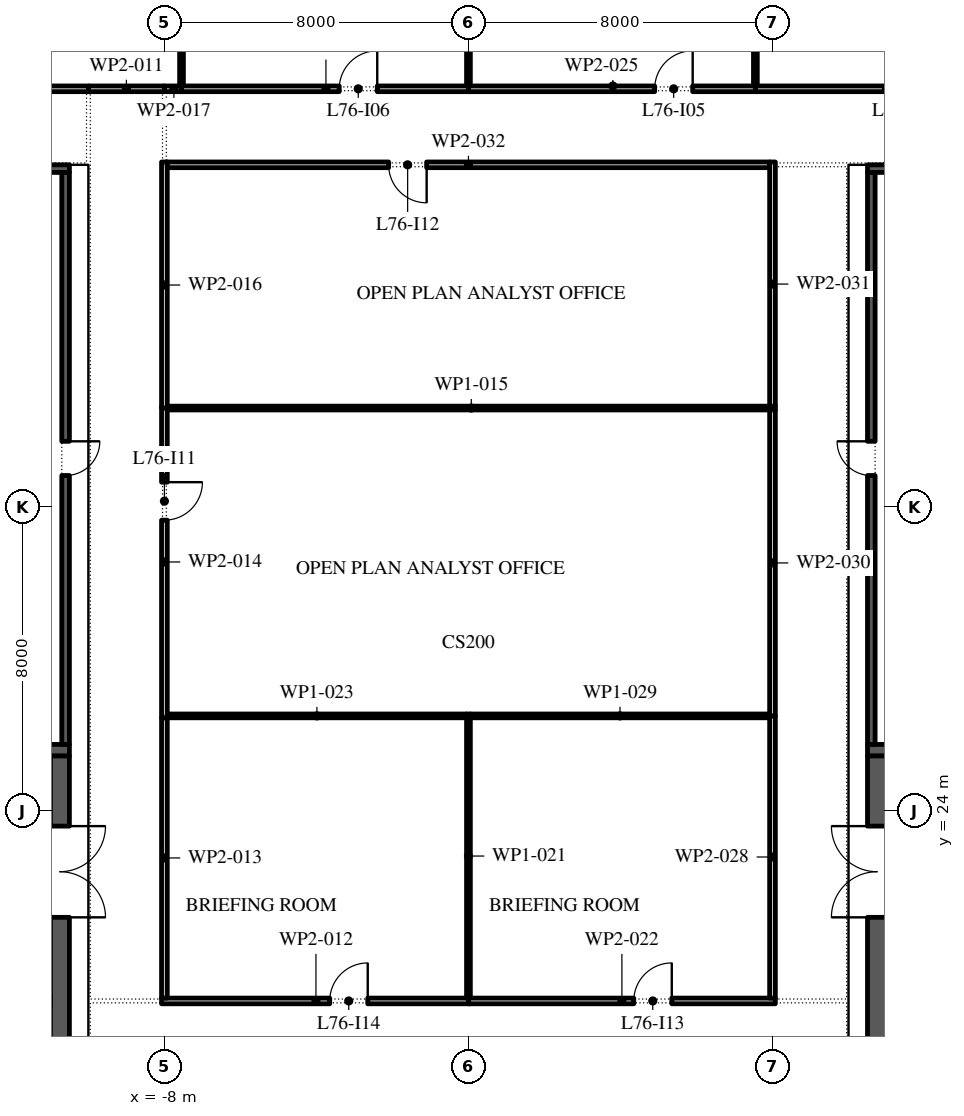
"""IFC4 building model, lengths in metres.
Left out: names, types, materials, properties, quantities, classifications, styles, units other than length and angle.
Written with IfcOpenShell. Run it as: python <this file> out.ifc"""

import sys

from ifc_helpers import new_model, si_unit, direction, frame, frame_2d, origin, place, context, subcontext, project, spatial, rectangle, extrude, element, fill, save


model = new_model("IFC4")
c1 = context("Model", 3, precision=1e-05, world=origin(), true_north=direction((0.0, 1.0)))
c2 = subcontext(c1, "Body", "Model", "MODEL_VIEW")
j1 = project(units=[si_unit("LENGTHUNIT", "METRE"), si_unit("PLANEANGLEUNIT", "RADIAN")], contexts=[c1])
p1 = place(None, origin())
s1 = spatial("IfcSite", under=j1, at=p1, CompositionType="ELEMENT")
p2 = place(p1, origin())
s2 = spatial("IfcBuilding", under=s1, at=p2, CompositionType="ELEMENT")
p3 = place(p2, frame((0.0, 0.0, 346.8)))
s3 = spatial("IfcBuildingStorey", under=s2, at=p3, CompositionType="ELEMENT", Elevation=346.8)
p4 = place(p3, frame((-10.75, -2.45, 0.0), z_axis=(0.0, 0.0, 1.0), x_axis=(0.0, 1.0, 0.0)))
e1 = element("IfcWall", 1, at=p4, inside=s3, PredefinedType="SHEAR", context=c2, shape_type="SweptSolid", body=[
    extrude(rectangle(XDim=27.9, YDim=0.5, at=frame_2d((13.95, 0.0))), origin(), (0.0, 0.0, 1.0), 4.0),
])
p5 = place(p4, frame((23.65, 0.0, 0.0)))
e2 = element("IfcOpeningElement", 2, at=p5, cuts=e1, PredefinedType="OPENING", context=c2, shape_type="SweptSolid", body=[
    extrude(rectangle(XDim=2.4, YDim=2.1, at=frame_2d((1.2, 1.05))), frame((0.0, 0.26, 0.0), z_axis=(0.0, -1.0, 0.0), x_axis=(1.0, 0.0, 0.0)), (0.0, 0.0, 1.0), 0.52),
])
p6 = place(p4, frame((1.387, 0.0, 0.0)))
e3 = element("IfcOpeningElement", 3, at=p6, cuts=e1, PredefinedType="OPENING", context=c2, shape_type="SweptSolid", body=[
    extrude(rectangle(XDim=0.9, YDim=2.1, at=frame_2d((0.45, 1.05))), frame((0.0, 0.26, 0.0), z_axis=(0.0, -1.0, 0.0), x_axis=(1.0, 0.0, 0.0)), (0.0, 0.0, 1.0), 0.52),
])
p7 = place(p4, frame((4.562, 0.0, 0.0)))
e4 = element("IfcOpeningElement", 4, at=p7, cuts=e1, PredefinedType="OPENING", context=c2, shape_type="SweptSolid", body=[
    extrude(rectangle(XDim=1.0, YDim=2.1, at=frame_2d((0.5, 1.05))), frame((0.0, 0.26, 0.0), z_axis=(0.0, -1.0, 0.0), x_axis=(1.0, 0.0, 0.0)), (0.0, 0.0, 1.0), 0.52),
])
p8 = place(p3, frame((-21.5, 25.6, 0.0), z_axis=(0.0, 0.0, 1.0), x_axis=(1.0, 0.0, 0.0)))
e5 = element("IfcWall", 5, at=p8, inside=s3, PredefinedType="SHEAR", context=c2, shape_type="SweptSolid", body=[
    extrude(rectangle(XDim=11.0, YDim=0.3, at=frame_2d((5.5, 0.0))), origin(), (0.0, 0.0, 1.0), 4.0),
])
p9 = place(p3, frame((-10.6, 25.75, 0.0), z_axis=(0.0, 0.0, 1.0), x_axis=(0.0, 1.0, 0.0)))
e6 = element("IfcWall", 6, at=p9, inside=s3, PredefinedType="SHEAR", context=c2, shape_type="SweptSolid", body=[
    extrude(rectangle(XDim=15.05, YDim=0.2, at=frame_2d((7.525, 0.0))), origin(), (0.0, 0.0, 1.0), 4.0),
])
p10 = place(p9, frame((7.075, 0.0, 0.0)))
e7 = element("IfcOpeningElement", 7, at=p10, cuts=e6, PredefinedType="OPENING", context=c2, shape_type="SweptSolid", body=[
    extrude(rectangle(XDim=0.9, YDim=2.1, at=frame_2d((0.45, 1.05))), frame((0.0, 0.11, 0.0), z_axis=(0.0, -1.0, 0.0), x_axis=(1.0, 0.0, 0.0)), (0.0, 0.0, 1.0), 0.22),
])
p11 = place(p3, frame((-21.5, 40.9, 0.0), z_axis=(0.0, 0.0, 1.0), x_axis=(1.0, 0.0, 0.0)))
e8 = element("IfcWall", 8, at=p11, inside=s3, PredefinedType="SHEAR", context=c2, shape_type="SweptSolid", body=[
    extrude(rectangle(XDim=11.0, YDim=0.2, at=frame_2d((5.5, 0.0))), origin(), (0.0, 0.0, 1.0), 4.0),
])
p12 = place(p3, frame((10.75, -2.45, 0.0), z_axis=(0.0, 0.0, 1.0), x_axis=(0.0, 1.0, 0.0)))
e9 = element("IfcWall", 9, at=p12, inside=s3, PredefinedType="SHEAR", context=c2, shape_type="SweptSolid", body=[
    extrude(rectangle(XDim=27.9, YDim=0.5, at=frame_2d((13.95, 0.0))), origin(), (0.0, 0.0, 1.0), 4.0),
])
p13 = place(p12, frame((23.65, 0.0, 0.0)))
e10 = element("IfcOpeningElement", 10, at=p13, cuts=e9, PredefinedType="OPENING", context=c2, shape_type="SweptSolid", body=[
    extrude(rectangle(XDim=2.4, YDim=2.1, at=frame_2d((1.2, 1.05))), frame((0.0, 0.26, 0.0), z_axis=(0.0, -1.0, 0.0), x_axis=(1.0, 0.0, 0.0)), (0.0, 0.0, 1.0), 0.52),
])
p14 = place(p12, frame((0.788, 0.0, 0.0)))
e11 = element("IfcOpeningElement", 11, at=p14, cuts=e9, PredefinedType="OPENING", context=c2, shape_type="SweptSolid", body=[
    extrude(rectangle(XDim=0.9, YDim=2.1, at=frame_2d((0.45, 1.05))), frame((0.0, 0.26, 0.0), z_axis=(0.0, -1.0, 0.0), x_axis=(1.0, 0.0, 0.0)), (0.0, 0.0, 1.0), 0.52),
])
p15 = place(p12, frame((3.962, 0.0, 0.0)))
e12 = element("IfcOpeningElement", 12, at=p15, cuts=e9, PredefinedType="OPENING", context=c2, shape_type="SweptSolid", body=[
    extrude(rectangle(XDim=1.0, YDim=2.1, at=frame_2d((0.5, 1.05))), frame((0.0, 0.26, 0.0), z_axis=(0.0, -1.0, 0.0), x_axis=(1.0, 0.0, 0.0)), (0.0, 0.0, 1.0), 0.52),
])
p16 = place(p3, frame((10.5, 25.6, 0.0), z_axis=(0.0, 0.0, 1.0), x_axis=(1.0, 0.0, 0.0)))
e13 = element("IfcWall", 13, at=p16, inside=s3, PredefinedType="SHEAR", context=c2, shape_type="SweptSolid", body=[
    extrude(rectangle(XDim=11.0, YDim=0.3, at=frame_2d((5.5, 0.0))), origin(), (0.0, 0.0, 1.0), 4.0),
])
p17 = place(p3, frame((10.6, 25.75, 0.0), z_axis=(0.0, 0.0, 1.0), x_axis=(0.0, 1.0, 0.0)))
e14 = element("IfcWall", 14, at=p17, inside=s3, PredefinedType="SHEAR", context=c2, shape_type="SweptSolid", body=[
    extrude(rectangle(XDim=15.05, YDim=0.2, at=frame_2d((7.525, 0.0))), origin(), (0.0, 0.0, 1.0), 4.0),
])
p18 = place(p17, frame((7.075, 0.0, 0.0)))
e15 = element("IfcOpeningElement", 15, at=p18, cuts=e14, PredefinedType="OPENING", context=c2, shape_type="SweptSolid", body=[
    extrude(rectangle(XDim=0.9, YDim=2.1, at=frame_2d((0.45, 1.05))), frame((0.0, 0.11, 0.0), z_axis=(0.0, -1.0, 0.0), x_axis=(1.0, 0.0, 0.0)), (0.0, 0.0, 1.0), 0.22),
])
p19 = place(p3, frame((10.5, 40.9, 0.0), z_axis=(0.0, 0.0, 1.0), x_axis=(1.0, 0.0, 0.0)))
e16 = element("IfcWall", 16, at=p19, inside=s3, PredefinedType="SHEAR", context=c2, shape_type="SweptSolid", body=[
    extrude(rectangle(XDim=11.0, YDim=0.2, at=frame_2d((5.5, 0.0))), origin(), (0.0, 0.0, 1.0), 4.0),
])
p20 = place(p3, frame((-15.1, 43.0, 0.0), z_axis=(0.0, 0.0, 1.0), x_axis=(1.0, 0.0, 0.0)))
e17 = element("IfcWall", 17, at=p20, inside=s3, PredefinedType="PARTITIONING", context=c2, shape_type="SweptSolid", body=[
    extrude(rectangle(XDim=5.1, YDim=0.15, at=frame_2d((2.55, 0.0))), origin(), (0.0, 0.0, 1.0), 4.0),
])
p21 = place(p20, frame((1.95, 0.0, 0.0)))
e18 = element("IfcOpeningElement", 18, at=p21, cuts=e17, PredefinedType="OPENING", context=c2, shape_type="SweptSolid", body=[
    extrude(rectangle(XDim=1.0, YDim=2.1, at=frame_2d((0.5, 1.05))), frame((0.0, 0.085, 0.0), z_axis=(0.0, -1.0, 0.0), x_axis=(1.0, 0.0, 0.0)), (0.0, 0.0, 1.0), 0.17),
])
p22 = place(p3, frame((-10.0, 43.0, 0.0), z_axis=(0.0, 0.0, 1.0), x_axis=(1.0, 0.0, 0.0)))
e19 = element("IfcWall", 19, at=p22, inside=s3, PredefinedType="PARTITIONING", context=c2, shape_type="SweptSolid", body=[
    extrude(rectangle(XDim=2.0, YDim=0.15, at=frame_2d((1.0, 0.0))), origin(), (0.0, 0.0, 1.0), 4.0),
])
p23 = place(p3, frame((-8.075, 19.0, 0.0), z_axis=(0.0, 0.0, 1.0), x_axis=(1.0, 0.0, 0.0)))
e20 = element("IfcWall", 20, at=p23, inside=s3, PredefinedType="PARTITIONING", context=c2, shape_type="SweptSolid", body=[
    extrude(rectangle(XDim=8.125, YDim=0.15, at=frame_2d((4.062, 0.0))), origin(), (0.0, 0.0, 1.0), 4.0),
])
p24 = place(p23, frame((4.425, 0.0, 0.0)))
e21 = element("IfcOpeningElement", 21, at=p24, cuts=e20, PredefinedType="OPENING", context=c2, shape_type="SweptSolid", body=[
    extrude(rectangle(XDim=1.0, YDim=2.1, at=frame_2d((0.5, 1.05))), frame((0.0, 0.085, 0.0), z_axis=(0.0, -1.0, 0.0), x_axis=(1.0, 0.0, 0.0)), (0.0, 0.0, 1.0), 0.17),
])
p25 = place(p3, frame((-8.0, 26.45, 0.0), z_axis=(0.0, 0.0, 1.0), x_axis=(0.0, -1.0, 0.0)))
e22 = element("IfcWall", 22, at=p25, inside=s3, PredefinedType="PARTITIONING", context=c2, shape_type="SweptSolid", body=[
    extrude(rectangle(XDim=7.375, YDim=0.15, at=frame_2d((3.688, 0.0))), origin(), (0.0, 0.0, 1.0), 4.0),
])
p26 = place(p3, frame((-8.0, 34.65, 0.0), z_axis=(0.0, 0.0, 1.0), x_axis=(0.0, -1.0, 0.0)))
e23 = element("IfcWall", 23, at=p26, inside=s3, PredefinedType="PARTITIONING", context=c2, shape_type="SweptSolid", body=[
    extrude(rectangle(XDim=8.2, YDim=0.15, at=frame_2d((4.1, 0.0))), origin(), (0.0, 0.0, 1.0), 4.0),
])
p27 = place(p26, frame((2.0, 0.0, 0.0)))
e24 = element("IfcOpeningElement", 24, at=p27, cuts=e23, PredefinedType="OPENING", context=c2, shape_type="SweptSolid", body=[
    extrude(rectangle(XDim=1.0, YDim=2.1, at=frame_2d((0.5, 1.05))), frame((0.0, 0.085, 0.0), z_axis=(0.0, -1.0, 0.0), x_axis=(1.0, 0.0, 0.0)), (0.0, 0.0, 1.0), 0.17),
])
p28 = place(p3, frame((-7.925, 34.6, 0.0), z_axis=(0.0, 0.0, 1.0), x_axis=(1.0, 0.0, 0.0)))
e25 = element("IfcWall", 25, at=p28, inside=s3, PredefinedType="PARTITIONING", context=c2, shape_type="SweptSolid", body=[
    extrude(rectangle(XDim=16.0, YDim=0.1, at=frame_2d((8.0, 0.0))), origin(), (0.0, 0.0, 1.0), 4.0),
])
p29 = place(p3, frame((-8.0, 41.075, 0.0), z_axis=(0.0, 0.0, 1.0), x_axis=(0.0, -1.0, 0.0)))
e26 = element("IfcWall", 26, at=p29, inside=s3, PredefinedType="PARTITIONING", context=c2, shape_type="SweptSolid", body=[
    extrude(rectangle(XDim=6.475, YDim=0.15, at=frame_2d((3.237, 0.0))), origin(), (0.0, 0.0, 1.0), 4.0),
])
p30 = place(p3, frame((-8.0, 43.0, 0.0), z_axis=(0.0, 0.0, 1.0), x_axis=(1.0, 0.0, 0.0)))
e27 = element("IfcWall", 27, at=p30, inside=s3, PredefinedType="PARTITIONING", context=c2, shape_type="SweptSolid", body=[
    extrude(rectangle(XDim=0.5, YDim=0.15, at=frame_2d((0.25, 0.0))), origin(), (0.0, 0.0, 1.0), 4.0),
])
p31 = place(p3, frame((-7.55, 43.075, 0.0), z_axis=(0.0, 0.0, 1.0), x_axis=(0.0, 1.0, 0.0)))
e28 = element("IfcWall", 28, at=p31, inside=s3, PredefinedType="PARTITIONING", context=c2, shape_type="SweptSolid", body=[
    extrude(rectangle(XDim=3.875, YDim=0.1, at=frame_2d((1.938, 0.0))), origin(), (0.0, 0.0, 1.0), 3.096),
])
p32 = place(p3, frame((-7.55, 43.0, 0.0), z_axis=(0.0, 0.0, 1.0), x_axis=(1.0, 0.0, 0.0)))
e29 = element("IfcWall", 29, at=p32, inside=s3, PredefinedType="PARTITIONING", context=c2, shape_type="SweptSolid", body=[
    extrude(rectangle(XDim=7.6, YDim=0.15, at=frame_2d((3.8, 0.0))), origin(), (0.0, 0.0, 1.0), 4.0),
])
p33 = place(p32, frame((4.15, 0.0, 0.0)))
e30 = element("IfcOpeningElement", 30, at=p33, cuts=e29, PredefinedType="OPENING", context=c2, shape_type="SweptSolid", body=[
    extrude(rectangle(XDim=1.0, YDim=2.1, at=frame_2d((0.5, 1.05))), frame((0.0, 0.085, 0.0), z_axis=(0.0, -1.0, 0.0), x_axis=(1.0, 0.0, 0.0)), (0.0, 0.0, 1.0), 0.17),
])
p34 = place(p3, frame((0.0, 19.075, 0.0), z_axis=(0.0, 0.0, 1.0), x_axis=(0.0, 1.0, 0.0)))
e31 = element("IfcWall", 31, at=p34, inside=s3, PredefinedType="PARTITIONING", context=c2, shape_type="SweptSolid", body=[
    extrude(rectangle(XDim=7.475, YDim=0.1, at=frame_2d((3.738, 0.0))), origin(), (0.0, 0.0, 1.0), 4.0),
])
p35 = place(p3, frame((0.0, 19.0, 0.0), z_axis=(0.0, 0.0, 1.0), x_axis=(1.0, 0.0, 0.0)))
e32 = element("IfcWall", 32, at=p35, inside=s3, PredefinedType="PARTITIONING", context=c2, shape_type="SweptSolid", body=[
    extrude(rectangle(XDim=8.075, YDim=0.15, at=frame_2d((4.038, 0.0))), origin(), (0.0, 0.0, 1.0), 4.0),
])
p36 = place(p35, frame((4.35, 0.0, 0.0)))
e33 = element("IfcOpeningElement", 33, at=p36, cuts=e32, PredefinedType="OPENING", context=c2, shape_type="SweptSolid", body=[
    extrude(rectangle(XDim=1.0, YDim=2.1, at=frame_2d((0.5, 1.05))), frame((0.0, 0.085, 0.0), z_axis=(0.0, -1.0, 0.0), x_axis=(1.0, 0.0, 0.0)), (0.0, 0.0, 1.0), 0.17),
])
p37 = place(p3, frame((-0.05, 26.5, 0.0), z_axis=(0.0, 0.0, 1.0), x_axis=(-1.0, 0.0, 0.0)))
e34 = element("IfcWall", 34, at=p37, inside=s3, PredefinedType="PARTITIONING", context=c2, shape_type="SweptSolid", body=[
    extrude(rectangle(XDim=7.875, YDim=0.1, at=frame_2d((3.938, 0.0))), origin(), (0.0, 0.0, 1.0), 4.0),
])
p38 = place(p3, frame((0.0, 43.075, 0.0), z_axis=(0.0, 0.0, 1.0), x_axis=(0.0, 1.0, 0.0)))
e35 = element("IfcWall", 35, at=p38, inside=s3, PredefinedType="PARTITIONING", context=c2, shape_type="SweptSolid", body=[
    extrude(rectangle(XDim=9.725, YDim=0.1, at=frame_2d((4.863, 0.0))), origin(), (0.0, 0.0, 1.0), 4.0),
])
p39 = place(p3, frame((0.0, 43.0, 0.0), z_axis=(0.0, 0.0, 1.0), x_axis=(1.0, 0.0, 0.0)))
e36 = element("IfcWall", 36, at=p39, inside=s3, PredefinedType="PARTITIONING", context=c2, shape_type="SweptSolid", body=[
    extrude(rectangle(XDim=7.6, YDim=0.15, at=frame_2d((3.8, 0.0))), origin(), (0.0, 0.0, 1.0), 4.0),
])
p40 = place(p39, frame((4.9, 0.0, 0.0)))
e37 = element("IfcOpeningElement", 37, at=p40, cuts=e36, PredefinedType="OPENING", context=c2, shape_type="SweptSolid", body=[
    extrude(rectangle(XDim=1.0, YDim=2.1, at=frame_2d((0.5, 1.05))), frame((0.0, 0.085, 0.0), z_axis=(0.0, -1.0, 0.0), x_axis=(1.0, 0.0, 0.0)), (0.0, 0.0, 1.0), 0.17),
])
p41 = place(p3, frame((7.55, 43.075, 0.0), z_axis=(0.0, 0.0, 1.0), x_axis=(0.0, 1.0, 0.0)))
e38 = element("IfcWall", 38, at=p41, inside=s3, PredefinedType="PARTITIONING", context=c2, shape_type="SweptSolid", body=[
    extrude(rectangle(XDim=9.725, YDim=0.1, at=frame_2d((4.863, 0.0))), origin(), (0.0, 0.0, 1.0), 3.096),
])
p42 = place(p3, frame((7.55, 43.0, 0.0), z_axis=(0.0, 0.0, 1.0), x_axis=(1.0, 0.0, 0.0)))
e39 = element("IfcWall", 39, at=p42, inside=s3, PredefinedType="PARTITIONING", context=c2, shape_type="SweptSolid", body=[
    extrude(rectangle(XDim=7.5, YDim=0.15, at=frame_2d((3.75, 0.0))), origin(), (0.0, 0.0, 1.0), 4.0),
])
p43 = place(p42, frame((3.4, 0.0, 0.0)))
e40 = element("IfcOpeningElement", 40, at=p43, cuts=e39, PredefinedType="OPENING", context=c2, shape_type="SweptSolid", body=[
    extrude(rectangle(XDim=1.0, YDim=2.1, at=frame_2d((0.5, 1.05))), frame((0.0, 0.085, 0.0), z_axis=(0.0, -1.0, 0.0), x_axis=(1.0, 0.0, 0.0)), (0.0, 0.0, 1.0), 0.17),
])
p44 = place(p3, frame((8.0, 19.075, 0.0), z_axis=(0.0, 0.0, 1.0), x_axis=(0.0, 1.0, 0.0)))
e41 = element("IfcWall", 41, at=p44, inside=s3, PredefinedType="PARTITIONING", context=c2, shape_type="SweptSolid", body=[
    extrude(rectangle(XDim=7.425, YDim=0.15, at=frame_2d((3.712, 0.0))), origin(), (0.0, 0.0, 1.0), 4.0),
])
p45 = place(p3, frame((7.925, 26.5, 0.0), z_axis=(0.0, 0.0, 1.0), x_axis=(-1.0, 0.0, 0.0)))
e42 = element("IfcWall", 42, at=p45, inside=s3, PredefinedType="PARTITIONING", context=c2, shape_type="SweptSolid", body=[
    extrude(rectangle(XDim=7.875, YDim=0.1, at=frame_2d((3.938, 0.0))), origin(), (0.0, 0.0, 1.0), 4.0),
])
p46 = place(p3, frame((8.0, 26.5, 0.0), z_axis=(0.0, 0.0, 1.0), x_axis=(0.0, 1.0, 0.0)))
e43 = element("IfcWall", 43, at=p46, inside=s3, PredefinedType="PARTITIONING", context=c2, shape_type="SweptSolid", body=[
    extrude(rectangle(XDim=8.05, YDim=0.15, at=frame_2d((4.025, 0.0))), origin(), (0.0, 0.0, 1.0), 4.0),
])
p47 = place(p3, frame((8.0, 34.65, 0.0), z_axis=(0.0, 0.0, 1.0), x_axis=(0.0, 1.0, 0.0)))
e44 = element("IfcWall", 44, at=p47, inside=s3, PredefinedType="PARTITIONING", context=c2, shape_type="SweptSolid", body=[
    extrude(rectangle(XDim=6.425, YDim=0.15, at=frame_2d((3.212, 0.0))), origin(), (0.0, 0.0, 1.0), 4.0),
])
p48 = place(p3, frame((7.925, 41.0, 0.0), z_axis=(0.0, 0.0, 1.0), x_axis=(-1.0, 0.0, 0.0)))
e45 = element("IfcWall", 45, at=p48, inside=s3, PredefinedType="PARTITIONING", context=c2, shape_type="SweptSolid", body=[
    extrude(rectangle(XDim=15.85, YDim=0.15, at=frame_2d((7.925, 0.0))), origin(), (0.0, 0.0, 1.0), 4.0),
])
p49 = place(p48, frame((9.025, 0.0, 0.0)))
e46 = element("IfcOpeningElement", 46, at=p49, cuts=e45, PredefinedType="OPENING", context=c2, shape_type="SweptSolid", body=[
    extrude(rectangle(XDim=1.0, YDim=2.1, at=frame_2d((0.5, 1.05))), frame((0.0, 0.085, 0.0), z_axis=(0.0, -1.0, 0.0), x_axis=(1.0, 0.0, 0.0)), (0.0, 0.0, 1.0), 0.17),
])
p50 = place(p5, frame((2.4, 0.0, 0.0), z_axis=(0.0, 0.0, 1.0), x_axis=(-1.0, 0.0, 0.0)))
e47 = element("IfcDoor", 47, at=p50, inside=s3, OperationType="DOUBLE_DOOR_SINGLE_SWING", PredefinedType="DOOR", context=c2, shape_type="SweptSolid", body=[
    extrude(rectangle(XDim=2.4, YDim=2.1, at=frame_2d((1.2, 1.05))), frame((0.0, 0.025, 0.0), z_axis=(0.0, -1.0, 0.0), x_axis=(1.0, 0.0, 0.0)), (0.0, 0.0, 1.0), 0.05),
])
fill(e2, e47)
p51 = place(p10, frame((0.9, 0.15, 0.0), z_axis=(0.0, 0.0, 1.0), x_axis=(-1.0, 0.0, 0.0)))
e48 = element("IfcDoor", 48, at=p51, inside=s3, OperationType="SINGLE_SWING_RIGHT", PredefinedType="DOOR", context=c2, shape_type="SweptSolid", body=[
    extrude(rectangle(XDim=0.9, YDim=2.1, at=frame_2d((0.45, 1.05))), frame((0.0, 0.1, 0.0), z_axis=(0.0, -1.0, 0.0), x_axis=(1.0, 0.0, 0.0)), (0.0, 0.0, 1.0), 0.05),
])
fill(e7, e48)
p52 = place(p13, origin())
e49 = element("IfcDoor", 49, at=p52, inside=s3, OperationType="DOUBLE_DOOR_SINGLE_SWING", PredefinedType="DOOR", context=c2, shape_type="SweptSolid", body=[
    extrude(rectangle(XDim=2.4, YDim=2.1, at=frame_2d((1.2, 1.05))), frame((0.0, 0.025, 0.0), z_axis=(0.0, -1.0, 0.0), x_axis=(1.0, 0.0, 0.0)), (0.0, 0.0, 1.0), 0.05),
])
fill(e10, e49)
p53 = place(p18, origin())
e50 = element("IfcDoor", 50, at=p53, inside=s3, OperationType="SINGLE_SWING_LEFT", PredefinedType="DOOR", context=c2, shape_type="SweptSolid", body=[
    extrude(rectangle(XDim=0.9, YDim=2.1, at=frame_2d((0.45, 1.05))), frame((0.0, -0.05, 0.0), z_axis=(0.0, -1.0, 0.0), x_axis=(1.0, 0.0, 0.0)), (0.0, 0.0, 1.0), 0.05),
])
fill(e15, e50)
p54 = place(p40, origin())
e51 = element("IfcDoor", 51, at=p54, inside=s3, OperationType="SINGLE_SWING_LEFT", PredefinedType="DOOR", context=c2, shape_type="SweptSolid", body=[
    extrude(rectangle(XDim=1.0, YDim=2.1, at=frame_2d((0.5, 1.05))), frame((0.0, 0.025, 0.0), z_axis=(0.0, -1.0, 0.0), x_axis=(1.0, 0.0, 0.0)), (0.0, 0.0, 1.0), 0.05),
])
fill(e37, e51)
p55 = place(p33, origin())
e52 = element("IfcDoor", 52, at=p55, inside=s3, OperationType="SINGLE_SWING_LEFT", PredefinedType="DOOR", context=c2, shape_type="SweptSolid", body=[
    extrude(rectangle(XDim=1.0, YDim=2.1, at=frame_2d((0.5, 1.05))), frame((0.0, 0.025, 0.0), z_axis=(0.0, -1.0, 0.0), x_axis=(1.0, 0.0, 0.0)), (0.0, 0.0, 1.0), 0.05),
])
fill(e30, e52)
p56 = place(p27, origin())
e53 = element("IfcDoor", 53, at=p56, inside=s3, OperationType="SINGLE_SWING_RIGHT", PredefinedType="DOOR", context=c2, shape_type="SweptSolid", body=[
    extrude(rectangle(XDim=1.0, YDim=2.1, at=frame_2d((0.5, 1.05))), frame((0.0, 0.025, 0.0), z_axis=(0.0, -1.0, 0.0), x_axis=(1.0, 0.0, 0.0)), (0.0, 0.0, 1.0), 0.05),
])
fill(e24, e53)
p57 = place(p49, origin())
e54 = element("IfcDoor", 54, at=p57, inside=s3, OperationType="SINGLE_SWING_RIGHT", PredefinedType="DOOR", context=c2, shape_type="SweptSolid", body=[
    extrude(rectangle(XDim=1.0, YDim=2.1, at=frame_2d((0.5, 1.05))), frame((0.0, 0.025, 0.0), z_axis=(0.0, -1.0, 0.0), x_axis=(1.0, 0.0, 0.0)), (0.0, 0.0, 1.0), 0.05),
])
fill(e46, e54)
p58 = place(p36, origin())
e55 = element("IfcDoor", 55, at=p58, inside=s3, OperationType="SINGLE_SWING_LEFT", PredefinedType="DOOR", context=c2, shape_type="SweptSolid", body=[
    extrude(rectangle(XDim=1.0, YDim=2.1, at=frame_2d((0.5, 1.05))), frame((0.0, 0.025, 0.0), z_axis=(0.0, -1.0, 0.0), x_axis=(1.0, 0.0, 0.0)), (0.0, 0.0, 1.0), 0.05),
])
fill(e33, e55)
p59 = place(p24, origin())
e56 = element("IfcDoor", 56, at=p59, inside=s3, OperationType="SINGLE_SWING_LEFT", PredefinedType="DOOR", context=c2, shape_type="SweptSolid", body=[
    extrude(rectangle(XDim=1.0, YDim=2.1, at=frame_2d((0.5, 1.05))), frame((0.0, 0.025, 0.0), z_axis=(0.0, -1.0, 0.0), x_axis=(1.0, 0.0, 0.0)), (0.0, 0.0, 1.0), 0.05),
])
fill(e21, e56)
save(model, sys.argv[1])
